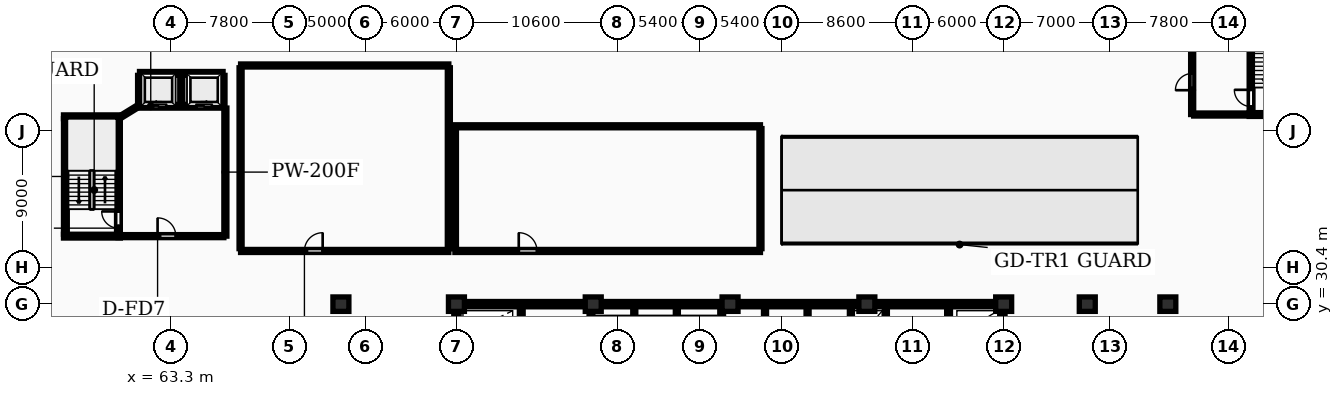
"""IFC4 building model, lengths in metres.
Left out: names, types, materials, properties, quantities, classifications, styles, units other than length and angle.
Written with IfcOpenShell. Run it as: python <this file> out.ifc"""

import sys

from ifc_helpers import new_model, si_unit, direction, frame, frame_2d, origin, origin_2d, place, context, subcontext, project, spatial, rectangle, extrude, element, fill, save


model = new_model("IFC4")
c1 = context("Model", 3, precision=1e-05, world=origin(), true_north=direction((0.0, 1.0)))
c2 = subcontext(c1, "Body", "Model", "MODEL_VIEW")
j1 = project(units=[si_unit("LENGTHUNIT", "METRE"), si_unit("PLANEANGLEUNIT", "RADIAN")], contexts=[c1])
p1 = place(None, origin())
s1 = spatial("IfcSite", under=j1, at=p1, CompositionType="ELEMENT")
p2 = place(p1, origin())
s2 = spatial("IfcBuilding", under=s1, at=p2, CompositionType="ELEMENT")
p3 = place(p2, frame((0.0, 0.0, -7.2)))
s3 = spatial("IfcBuildingStorey", under=s2, at=p3, CompositionType="ELEMENT", Elevation=-7.2)
for number, where, z_axis, x_axis in (
    (1, (74.5, 30.4, 0.0), (0.0, 0.0, 1.0), (1.0, 0.0, 0.0)),
    (2, (82.1, 30.4, 0.0), (0.0, 0.0, 1.0), (1.0, 0.0, 0.0)),
    (3, (91.1, 30.4, 0.0), (0.0, 0.0, 1.0), (1.0, 0.0, 0.0)),
    (4, (100.1, 30.4, 0.0), (0.0, 0.0, 1.0), (1.0, 0.0, 0.0)),
    (5, (109.1, 30.4, 0.0), (0.0, 0.0, 1.0), (1.0, 0.0, 0.0)),
    (6, (118.1, 30.4, 0.0), (0.0, 0.0, 1.0), (1.0, 0.0, 0.0)),
    (7, (123.6, 30.4, 0.0), (0.0, 0.0, 1.0), (1.0, 0.0, 0.0)),
    (8, (128.9, 30.4, 0.0), (0.0, 0.0, 1.0), (1.0, 0.0, 0.0)),
):
    element("IfcColumn", number, at=place(p3, frame(where, z_axis=z_axis, x_axis=x_axis)), inside=s3, PredefinedType="COLUMN", context=c2, shape_type="SweptSolid", body=[
        extrude(rectangle(XDim=1.05, YDim=0.95, at=origin_2d()), origin(), (0.0, 0.0, 1.0), 3.6),
    ])
p4 = place(p3, frame((81.925, 30.4, 0.0), z_axis=(0.0, 0.0, 1.0), x_axis=(1.0, 0.0, 0.0)))
e9 = element("IfcWall", 9, at=p4, inside=s3, PredefinedType="SHEAR", context=c2, shape_type="SweptSolid", body=[
    extrude(rectangle(XDim=36.265, YDim=0.35, at=frame_2d((18.132, 0.0))), origin(), (0.0, 0.0, 1.0), 3.6),
])
for number, where, z_axis, x_axis in (
    (10, (82.1, 18.575, 0.0), (0.0, 0.0, 1.0), (0.0, 1.0, 0.0)),
    (11, (118.015, 18.575, 0.0), (0.0, 0.0, 1.0), (0.0, 1.0, 0.0)),
):
    element("IfcWall", number, at=place(p3, frame(where, z_axis=z_axis, x_axis=x_axis)), inside=s3, PredefinedType="SHEAR", context=c2, shape_type="SweptSolid", body=[
        extrude(rectangle(XDim=11.65, YDim=0.35, at=frame_2d((5.825, 0.0))), origin(), (0.0, 0.0, 1.0), 3.6),
    ])
p5 = place(p3, frame((86.365, 18.6, 0.0), z_axis=(0.0, 0.0, 1.0), x_axis=(0.0, 1.0, 0.0)))
e12 = element("IfcWall", 12, at=p5, inside=s3, PredefinedType="SHEAR", context=c2, shape_type="SweptSolid", body=[
    extrude(rectangle(XDim=11.6, YDim=0.25, at=frame_2d((5.8, 0.0))), origin(), (0.0, 0.0, 1.0), 3.6),
])
p6 = place(p5, frame((0.45, 0.0, 0.0)))
e13 = element("IfcOpeningElement", 13, at=p6, cuts=e12, PredefinedType="OPENING", context=c2, shape_type="SweptSolid", body=[
    extrude(rectangle(XDim=0.85, YDim=2.05, at=frame_2d((0.425, 1.025))), frame((0.0, 0.135, 0.0), z_axis=(0.0, -1.0, 0.0), x_axis=(1.0, 0.0, 0.0)), (0.0, 0.0, 1.0), 0.27),
])
p7 = place(p5, frame((2.05, 0.0, 0.0)))
e14 = element("IfcOpeningElement", 14, at=p7, cuts=e12, PredefinedType="OPENING", context=c2, shape_type="SweptSolid", body=[
    extrude(rectangle(XDim=1.1, YDim=2.1, at=frame_2d((0.55, 1.05))), frame((0.0, 0.135, 0.0), z_axis=(0.0, -1.0, 0.0), x_axis=(1.0, 0.0, 0.0)), (0.0, 0.0, 1.0), 0.27),
])
p8 = place(p5, frame((9.95, 0.0, 0.0)))
e15 = element("IfcOpeningElement", 15, at=p8, cuts=e12, PredefinedType="OPENING", context=c2, shape_type="SweptSolid", body=[
    extrude(rectangle(XDim=0.85, YDim=2.05, at=frame_2d((0.425, 1.025))), frame((0.0, 0.135, 0.0), z_axis=(0.0, -1.0, 0.0), x_axis=(1.0, 0.0, 0.0)), (0.0, 0.0, 1.0), 0.27),
])
p9 = place(p3, frame((90.95, 18.6, 0.0), z_axis=(0.0, 0.0, 1.0), x_axis=(0.0, 1.0, 0.0)))
e16 = element("IfcWall", 16, at=p9, inside=s3, PredefinedType="SHEAR", context=c2, shape_type="SweptSolid", body=[
    extrude(rectangle(XDim=11.6, YDim=0.25, at=frame_2d((5.8, 0.0))), origin(), (0.0, 0.0, 1.0), 3.6),
])
p10 = place(p9, frame((4.6, 0.0, 0.0)))
e17 = element("IfcOpeningElement", 17, at=p10, cuts=e16, PredefinedType="OPENING", context=c2, shape_type="SweptSolid", body=[
    extrude(rectangle(XDim=1.1, YDim=2.1, at=frame_2d((0.55, 1.05))), frame((0.0, 0.135, 0.0), z_axis=(0.0, -1.0, 0.0), x_axis=(1.0, 0.0, 0.0)), (0.0, 0.0, 1.0), 0.27),
])
for number, where, z_axis, x_axis in (
    (18, (93.8, 27.38, 0.0), (0.0, 0.0, 1.0), (0.0, 1.0, 0.0)),
    (19, (96.6, 27.38, 0.0), (0.0, 0.0, 1.0), (0.0, 1.0, 0.0)),
):
    element("IfcWall", number, at=place(p3, frame(where, z_axis=z_axis, x_axis=x_axis)), inside=s3, PredefinedType="PARTITIONING", context=c2, shape_type="SweptSolid", body=[
        extrude(rectangle(XDim=2.82, YDim=0.2, at=frame_2d((1.41, 0.0))), origin(), (0.0, 0.0, 1.0), 3.3),
    ])
p11 = place(p3, frame((99.55, 27.25, 0.0), z_axis=(0.0, 0.0, 1.0), x_axis=(0.0, 1.0, 0.0)))
e20 = element("IfcWall", 20, at=p11, inside=s3, PredefinedType="SHEAR", context=c2, shape_type="SweptSolid", body=[
    extrude(rectangle(XDim=2.95, YDim=0.25, at=frame_2d((1.475, 0.0))), origin(), (0.0, 0.0, 1.0), 3.6),
])
for number, where, z_axis, x_axis in (
    (21, (102.4, 27.38, 0.0), (0.0, 0.0, 1.0), (0.0, 1.0, 0.0)),
    (22, (105.2, 27.38, 0.0), (0.0, 0.0, 1.0), (0.0, 1.0, 0.0)),
    (23, (108.05, 27.38, 0.0), (0.0, 0.0, 1.0), (0.0, 1.0, 0.0)),
):
    element("IfcWall", number, at=place(p3, frame(where, z_axis=z_axis, x_axis=x_axis)), inside=s3, PredefinedType="PARTITIONING", context=c2, shape_type="SweptSolid", body=[
        extrude(rectangle(XDim=2.82, YDim=0.2, at=frame_2d((1.41, 0.0))), origin(), (0.0, 0.0, 1.0), 3.3),
    ])
p12 = place(p3, frame((110.35, 18.6, 0.0), z_axis=(0.0, 0.0, 1.0), x_axis=(0.0, 1.0, 0.0)))
e24 = element("IfcWall", 24, at=p12, inside=s3, PredefinedType="PARTITIONING", context=c2, shape_type="SweptSolid", body=[
    extrude(rectangle(XDim=11.6, YDim=0.2, at=frame_2d((5.8, 0.0))), origin(), (0.0, 0.0, 1.0), 3.3),
])
p13 = place(p12, frame((5.2, 0.0, 0.0)))
e25 = element("IfcOpeningElement", 25, at=p13, cuts=e24, PredefinedType="OPENING", context=c2, shape_type="SweptSolid", body=[
    extrude(rectangle(XDim=1.1, YDim=2.15, at=frame_2d((0.55, 1.075))), frame((0.0, 0.11, 0.0), z_axis=(0.0, -1.0, 0.0), x_axis=(1.0, 0.0, 0.0)), (0.0, 0.0, 1.0), 0.22),
])
p14 = place(p3, frame((114.475, 18.6, 0.0), z_axis=(0.0, 0.0, 1.0), x_axis=(0.0, 1.0, 0.0)))
e26 = element("IfcWall", 26, at=p14, inside=s3, PredefinedType="SHEAR", context=c2, shape_type="SweptSolid", body=[
    extrude(rectangle(XDim=11.6, YDim=0.25, at=frame_2d((5.8, 0.0))), origin(), (0.0, 0.0, 1.0), 3.6),
])
p15 = place(p14, frame((0.45, 0.0, 0.0)))
e27 = element("IfcOpeningElement", 27, at=p15, cuts=e26, PredefinedType="OPENING", context=c2, shape_type="SweptSolid", body=[
    extrude(rectangle(XDim=0.85, YDim=2.05, at=frame_2d((0.425, 1.025))), frame((0.0, 0.135, 0.0), z_axis=(0.0, -1.0, 0.0), x_axis=(1.0, 0.0, 0.0)), (0.0, 0.0, 1.0), 0.27),
])
p16 = place(p14, frame((2.05, 0.0, 0.0)))
e28 = element("IfcOpeningElement", 28, at=p16, cuts=e26, PredefinedType="OPENING", context=c2, shape_type="SweptSolid", body=[
    extrude(rectangle(XDim=1.1, YDim=2.1, at=frame_2d((0.55, 1.05))), frame((0.0, 0.135, 0.0), z_axis=(0.0, -1.0, 0.0), x_axis=(1.0, 0.0, 0.0)), (0.0, 0.0, 1.0), 0.27),
])
p17 = place(p14, frame((9.95, 0.0, 0.0)))
e29 = element("IfcOpeningElement", 29, at=p17, cuts=e26, PredefinedType="OPENING", context=c2, shape_type="SweptSolid", body=[
    extrude(rectangle(XDim=0.85, YDim=2.05, at=frame_2d((0.425, 1.025))), frame((0.0, 0.135, 0.0), z_axis=(0.0, -1.0, 0.0), x_axis=(1.0, 0.0, 0.0)), (0.0, 0.0, 1.0), 0.27),
])
p18 = place(p3, frame((56.375, 35.0, 0.0), z_axis=(0.0, 0.0, 1.0), x_axis=(0.0, 1.0, 0.0)))
e30 = element("IfcWall", 30, at=p18, inside=s3, PredefinedType="SHEAR", context=c2, shape_type="SweptSolid", body=[
    extrude(rectangle(XDim=7.6, YDim=0.25, at=frame_2d((3.8, 0.0))), origin(), (0.0, 0.0, 1.0), 3.6),
])
for number, where, z_axis, x_axis in (
    (31, (56.25, 42.725, 0.0), (0.0, 0.0, 1.0), (1.0, 0.0, 0.0)),
    (32, (56.25, 34.875, 0.0), (0.0, 0.0, 1.0), (1.0, 0.0, 0.0)),
):
    element("IfcWall", number, at=place(p3, frame(where, z_axis=z_axis, x_axis=x_axis)), inside=s3, PredefinedType="SHEAR", context=c2, shape_type="SweptSolid", body=[
        extrude(rectangle(XDim=3.74, YDim=0.25, at=frame_2d((1.87, 0.0))), origin(), (0.0, 0.0, 1.0), 3.6),
    ])
p19 = place(p3, frame((59.865, 35.0, 0.0), z_axis=(0.0, 0.0, 1.0), x_axis=(0.0, 1.0, 0.0)))
e33 = element("IfcWall", 33, at=p19, inside=s3, PredefinedType="SHEAR", context=c2, shape_type="SweptSolid", body=[
    extrude(rectangle(XDim=7.6, YDim=0.25, at=frame_2d((3.8, 0.0))), origin(), (0.0, 0.0, 1.0), 3.6),
])
p20 = place(p19, frame((0.4, 0.0, 0.0)))
e34 = element("IfcOpeningElement", 34, at=p20, cuts=e33, PredefinedType="OPENING", context=c2, shape_type="SweptSolid", body=[
    extrude(rectangle(XDim=1.1, YDim=2.1, at=frame_2d((0.55, 1.05))), frame((0.0, 0.135, 0.0), z_axis=(0.0, -1.0, 0.0), x_axis=(1.0, 0.0, 0.0)), (0.0, 0.0, 1.0), 0.27),
])
p21 = place(p3, frame((61.25, 43.42, 0.0), z_axis=(0.0, 0.0, 1.0), x_axis=(1.0, 0.0, 0.0)))
e35 = element("IfcWall", 35, at=p21, inside=s3, PredefinedType="SHEAR", context=c2, shape_type="SweptSolid", body=[
    extrude(rectangle(XDim=5.5, YDim=0.25, at=frame_2d((2.75, 0.0))), origin(), (0.0, 0.0, 1.0), 3.6),
])
p22 = place(p21, frame((0.74, 0.0, 0.0)))
e36 = element("IfcOpeningElement", 36, at=p22, cuts=e35, PredefinedType="OPENING", context=c2, shape_type="SweptSolid", body=[
    extrude(rectangle(XDim=1.02, YDim=2.12, at=frame_2d((0.51, 1.06))), frame((0.0, 0.135, 0.0), z_axis=(0.0, -1.0, 0.0), x_axis=(1.0, 0.0, 0.0)), (0.0, 0.0, 1.0), 0.27),
])
p23 = place(p21, frame((3.74, 0.0, 0.0)))
e37 = element("IfcOpeningElement", 37, at=p23, cuts=e35, PredefinedType="OPENING", context=c2, shape_type="SweptSolid", body=[
    extrude(rectangle(XDim=1.02, YDim=2.12, at=frame_2d((0.51, 1.06))), frame((0.0, 0.135, 0.0), z_axis=(0.0, -1.0, 0.0), x_axis=(1.0, 0.0, 0.0)), (0.0, 0.0, 1.0), 0.27),
])
p24 = place(p3, frame((61.25, 45.58, 0.0), z_axis=(0.0, 0.0, 1.0), x_axis=(1.0, 0.0, 0.0)))
e38 = element("IfcWall", 38, at=p24, inside=s3, PredefinedType="SHEAR", context=c2, shape_type="SweptSolid", body=[
    extrude(rectangle(XDim=5.5, YDim=0.25, at=frame_2d((2.75, 0.0))), origin(), (0.0, 0.0, 1.0), 3.6),
])
for number, where, z_axis, x_axis in (
    (39, (61.25, 43.55, 0.0), (0.0, 0.0, 1.0), (0.0, 1.0, 0.0)),
    (40, (66.75, 43.55, 0.0), (0.0, 0.0, 1.0), (0.0, 1.0, 0.0)),
):
    element("IfcWall", number, at=place(p3, frame(where, z_axis=z_axis, x_axis=x_axis)), inside=s3, PredefinedType="SHEAR", context=c2, shape_type="SweptSolid", body=[
        extrude(rectangle(XDim=1.9, YDim=0.25, at=frame_2d((0.95, 0.0))), origin(), (0.0, 0.0, 1.0), 3.6),
    ])
p25 = place(p3, frame((64.0, 43.55, 0.0), z_axis=(0.0, 0.0, 1.0), x_axis=(0.0, 1.0, 0.0)))
e41 = element("IfcWall", 41, at=p25, inside=s3, PredefinedType="PARTITIONING", context=c2, shape_type="SweptSolid", body=[
    extrude(rectangle(XDim=1.9, YDim=0.2, at=frame_2d((0.95, 0.0))), origin(), (0.0, 0.0, 1.0), 3.3),
])
p26 = place(p3, frame((59.84, 34.875, 0.0), z_axis=(0.0, 0.0, 1.0), x_axis=(1.0, 0.0, 0.0)))
e42 = element("IfcWall", 42, at=p26, inside=s3, PredefinedType="PARTITIONING", context=c2, shape_type="SweptSolid", body=[
    extrude(rectangle(XDim=6.96, YDim=0.2, at=frame_2d((3.48, 0.0))), origin(), (0.0, 0.0, 1.0), 3.3),
])
p27 = place(p26, frame((2.6, 0.0, 0.0)))
e43 = element("IfcOpeningElement", 43, at=p27, cuts=e42, PredefinedType="OPENING", context=c2, shape_type="SweptSolid", body=[
    extrude(rectangle(XDim=1.2, YDim=2.18, at=frame_2d((0.6, 1.09))), frame((0.0, 0.11, 0.0), z_axis=(0.0, -1.0, 0.0), x_axis=(1.0, 0.0, 0.0)), (0.0, 0.0, 1.0), 0.22),
])
p28 = place(p3, frame((66.9, 34.875, 0.0), z_axis=(0.0, 0.0, 1.0), x_axis=(0.0, 1.0, 0.0)))
e44 = element("IfcWall", 44, at=p28, inside=s3, PredefinedType="PARTITIONING", context=c2, shape_type="SweptSolid", body=[
    extrude(rectangle(XDim=8.425, YDim=0.2, at=frame_2d((4.212, 0.0))), origin(), (0.0, 0.0, 1.0), 3.3),
])
p29 = place(p3, frame((60.02, 42.725, 0.0), z_axis=(0.0, 0.0, 1.0), x_axis=(0.851822584555, 0.523830396638, 0.0)))
e45 = element("IfcWall", 45, at=p29, inside=s3, PredefinedType="PARTITIONING", context=c2, shape_type="SweptSolid", body=[
    extrude(rectangle(XDim=1.326, YDim=0.2, at=frame_2d((0.663, 0.0))), origin(), (0.0, 0.0, 1.0), 3.3),
])
p30 = place(p3, frame((134.375, 43.0, 0.0), z_axis=(0.0, 0.0, 1.0), x_axis=(0.0, 1.0, 0.0)))
e46 = element("IfcWall", 46, at=p30, inside=s3, PredefinedType="SHEAR", context=c2, shape_type="SweptSolid", body=[
    extrude(rectangle(XDim=7.6, YDim=0.25, at=frame_2d((3.8, 0.0))), origin(), (0.0, 0.0, 1.0), 3.6),
])
p31 = place(p30, frame((0.4, 0.0, 0.0)))
e47 = element("IfcOpeningElement", 47, at=p31, cuts=e46, PredefinedType="OPENING", context=c2, shape_type="SweptSolid", body=[
    extrude(rectangle(XDim=1.1, YDim=2.1, at=frame_2d((0.55, 1.05))), frame((0.0, 0.135, 0.0), z_axis=(0.0, -1.0, 0.0), x_axis=(1.0, 0.0, 0.0)), (0.0, 0.0, 1.0), 0.27),
])
p32 = place(p3, frame((134.25, 42.875, 0.0), z_axis=(0.0, 0.0, 1.0), x_axis=(1.0, 0.0, 0.0)))
e48 = element("IfcWall", 48, at=p32, inside=s3, PredefinedType="SHEAR", context=c2, shape_type="SweptSolid", body=[
    extrude(rectangle(XDim=3.74, YDim=0.25, at=frame_2d((1.87, 0.0))), origin(), (0.0, 0.0, 1.0), 3.6),
])
p33 = place(p3, frame((130.5, 42.875, 0.0), z_axis=(0.0, 0.0, 1.0), x_axis=(0.0, 1.0, 0.0)))
e49 = element("IfcWall", 49, at=p33, inside=s3, PredefinedType="PARTITIONING", context=c2, shape_type="SweptSolid", body=[
    extrude(rectangle(XDim=4.825, YDim=0.2, at=frame_2d((2.413, 0.0))), origin(), (0.0, 0.0, 1.0), 3.3),
])
p34 = place(p33, frame((1.6, 0.0, 0.0)))
e50 = element("IfcOpeningElement", 50, at=p34, cuts=e49, PredefinedType="OPENING", context=c2, shape_type="SweptSolid", body=[
    extrude(rectangle(XDim=1.1, YDim=2.15, at=frame_2d((0.55, 1.075))), frame((0.0, 0.11, 0.0), z_axis=(0.0, -1.0, 0.0), x_axis=(1.0, 0.0, 0.0)), (0.0, 0.0, 1.0), 0.22),
])
p35 = place(p3, frame((130.6, 42.875, 0.0), z_axis=(0.0, 0.0, 1.0), x_axis=(1.0, 0.0, 0.0)))
e51 = element("IfcWall", 51, at=p35, inside=s3, PredefinedType="PARTITIONING", context=c2, shape_type="SweptSolid", body=[
    extrude(rectangle(XDim=3.65, YDim=0.2, at=frame_2d((1.825, 0.0))), origin(), (0.0, 0.0, 1.0), 3.3),
])
p36 = place(p3, frame((67.9, 33.9, 0.0), z_axis=(0.0, 0.0, 1.0), x_axis=(1.0, 0.0, 0.0)))
e52 = element("IfcWall", 52, at=p36, inside=s3, PredefinedType="PARTITIONING", context=c2, shape_type="SweptSolid", body=[
    extrude(rectangle(XDim=13.7, YDim=0.2, at=frame_2d((6.85, 0.0))), origin(), (0.0, 0.0, 1.0), 3.3),
])
p37 = place(p36, frame((4.2, 0.0, 0.0)))
e53 = element("IfcOpeningElement", 53, at=p37, cuts=e52, PredefinedType="OPENING", context=c2, shape_type="SweptSolid", body=[
    extrude(rectangle(XDim=1.2, YDim=2.15, at=frame_2d((0.6, 1.075))), frame((0.0, 0.11, 0.0), z_axis=(0.0, -1.0, 0.0), x_axis=(1.0, 0.0, 0.0)), (0.0, 0.0, 1.0), 0.22),
])
p38 = place(p3, frame((67.9, 46.1, 0.0), z_axis=(0.0, 0.0, 1.0), x_axis=(1.0, 0.0, 0.0)))
e54 = element("IfcWall", 54, at=p38, inside=s3, PredefinedType="PARTITIONING", context=c2, shape_type="SweptSolid", body=[
    extrude(rectangle(XDim=13.7, YDim=0.2, at=frame_2d((6.85, 0.0))), origin(), (0.0, 0.0, 1.0), 3.3),
])
for number, where, z_axis, x_axis in (
    (55, (67.9, 34.05, 0.0), (0.0, 0.0, 1.0), (0.0, 1.0, 0.0)),
    (56, (81.6, 34.05, 0.0), (0.0, 0.0, 1.0), (0.0, 1.0, 0.0)),
):
    element("IfcWall", number, at=place(p3, frame(where, z_axis=z_axis, x_axis=x_axis)), inside=s3, PredefinedType="PARTITIONING", context=c2, shape_type="SweptSolid", body=[
        extrude(rectangle(XDim=11.9, YDim=0.2, at=frame_2d((5.95, 0.0))), origin(), (0.0, 0.0, 1.0), 3.3),
    ])
p39 = place(p3, frame((82.0, 33.9, 0.0), z_axis=(0.0, 0.0, 1.0), x_axis=(1.0, 0.0, 0.0)))
e57 = element("IfcWall", 57, at=p39, inside=s3, PredefinedType="PARTITIONING", context=c2, shape_type="SweptSolid", body=[
    extrude(rectangle(XDim=20.1, YDim=0.2, at=frame_2d((10.05, 0.0))), origin(), (0.0, 0.0, 1.0), 3.3),
])
p40 = place(p39, frame((4.2, 0.0, 0.0)))
e58 = element("IfcOpeningElement", 58, at=p40, cuts=e57, PredefinedType="OPENING", context=c2, shape_type="SweptSolid", body=[
    extrude(rectangle(XDim=1.2, YDim=2.15, at=frame_2d((0.6, 1.075))), frame((0.0, 0.11, 0.0), z_axis=(0.0, -1.0, 0.0), x_axis=(1.0, 0.0, 0.0)), (0.0, 0.0, 1.0), 0.22),
])
p41 = place(p3, frame((82.0, 42.1, 0.0), z_axis=(0.0, 0.0, 1.0), x_axis=(1.0, 0.0, 0.0)))
e59 = element("IfcWall", 59, at=p41, inside=s3, PredefinedType="PARTITIONING", context=c2, shape_type="SweptSolid", body=[
    extrude(rectangle(XDim=20.1, YDim=0.2, at=frame_2d((10.05, 0.0))), origin(), (0.0, 0.0, 1.0), 3.3),
])
for number, where, z_axis, x_axis in (
    (60, (82.0, 34.05, 0.0), (0.0, 0.0, 1.0), (0.0, 1.0, 0.0)),
    (61, (102.1, 34.05, 0.0), (0.0, 0.0, 1.0), (0.0, 1.0, 0.0)),
):
    element("IfcWall", number, at=place(p3, frame(where, z_axis=z_axis, x_axis=x_axis)), inside=s3, PredefinedType="PARTITIONING", context=c2, shape_type="SweptSolid", body=[
        extrude(rectangle(XDim=7.9, YDim=0.2, at=frame_2d((3.95, 0.0))), origin(), (0.0, 0.0, 1.0), 3.3),
    ])
p42 = place(p20, origin())
e62 = element("IfcDoor", 62, at=p42, inside=s3, OperationType="SINGLE_SWING_RIGHT", PredefinedType="DOOR", context=c2, shape_type="SweptSolid", body=[
    extrude(rectangle(XDim=1.1, YDim=2.1, at=frame_2d((0.55, 1.05))), frame((0.0, 0.025, 0.0), z_axis=(0.0, -1.0, 0.0), x_axis=(1.0, 0.0, 0.0)), (0.0, 0.0, 1.0), 0.05),
])
fill(e34, e62)
p43 = place(p22, origin())
e63 = element("IfcDoor", 63, at=p43, inside=s3, OperationType="SLIDING_TO_LEFT", PredefinedType="DOOR", context=c2, shape_type="SweptSolid", body=[
    extrude(rectangle(XDim=1.02, YDim=2.12, at=frame_2d((0.51, 1.06))), frame((0.0, 0.025, 0.0), z_axis=(0.0, -1.0, 0.0), x_axis=(1.0, 0.0, 0.0)), (0.0, 0.0, 1.0), 0.05),
])
fill(e36, e63)
p44 = place(p23, origin())
e64 = element("IfcDoor", 64, at=p44, inside=s3, OperationType="SLIDING_TO_RIGHT", PredefinedType="DOOR", context=c2, shape_type="SweptSolid", body=[
    extrude(rectangle(XDim=1.02, YDim=2.12, at=frame_2d((0.51, 1.06))), frame((0.0, 0.025, 0.0), z_axis=(0.0, -1.0, 0.0), x_axis=(1.0, 0.0, 0.0)), (0.0, 0.0, 1.0), 0.05),
])
fill(e37, e64)
p45 = place(p27, origin())
e65 = element("IfcDoor", 65, at=p45, inside=s3, OperationType="SINGLE_SWING_LEFT", PredefinedType="DOOR", context=c2, shape_type="SweptSolid", body=[
    extrude(rectangle(XDim=1.2, YDim=2.18, at=frame_2d((0.6, 1.09))), frame((0.0, 0.025, 0.0), z_axis=(0.0, -1.0, 0.0), x_axis=(1.0, 0.0, 0.0)), (0.0, 0.0, 1.0), 0.05),
])
fill(e43, e65)
p46 = place(p31, origin())
e66 = element("IfcDoor", 66, at=p46, inside=s3, OperationType="SINGLE_SWING_RIGHT", PredefinedType="DOOR", context=c2, shape_type="SweptSolid", body=[
    extrude(rectangle(XDim=1.1, YDim=2.1, at=frame_2d((0.55, 1.05))), frame((0.0, 0.025, 0.0), z_axis=(0.0, -1.0, 0.0), x_axis=(1.0, 0.0, 0.0)), (0.0, 0.0, 1.0), 0.05),
])
fill(e47, e66)
p47 = place(p34, origin())
e67 = element("IfcDoor", 67, at=p47, inside=s3, OperationType="SINGLE_SWING_LEFT", PredefinedType="DOOR", context=c2, shape_type="SweptSolid", body=[
    extrude(rectangle(XDim=1.1, YDim=2.15, at=frame_2d((0.55, 1.075))), frame((0.0, 0.025, 0.0), z_axis=(0.0, -1.0, 0.0), x_axis=(1.0, 0.0, 0.0)), (0.0, 0.0, 1.0), 0.05),
])
fill(e50, e67)
p48 = place(p37, origin())
e68 = element("IfcDoor", 68, at=p48, inside=s3, OperationType="SINGLE_SWING_RIGHT", PredefinedType="DOOR", context=c2, shape_type="SweptSolid", body=[
    extrude(rectangle(XDim=1.2, YDim=2.15, at=frame_2d((0.6, 1.075))), frame((0.0, 0.025, 0.0), z_axis=(0.0, -1.0, 0.0), x_axis=(1.0, 0.0, 0.0)), (0.0, 0.0, 1.0), 0.05),
])
fill(e53, e68)
p49 = place(p40, origin())
e69 = element("IfcDoor", 69, at=p49, inside=s3, OperationType="SINGLE_SWING_LEFT", PredefinedType="DOOR", context=c2, shape_type="SweptSolid", body=[
    extrude(rectangle(XDim=1.2, YDim=2.15, at=frame_2d((0.6, 1.075))), frame((0.0, 0.025, 0.0), z_axis=(0.0, -1.0, 0.0), x_axis=(1.0, 0.0, 0.0)), (0.0, 0.0, 1.0), 0.05),
])
fill(e58, e69)
save(model, sys.argv[1])
